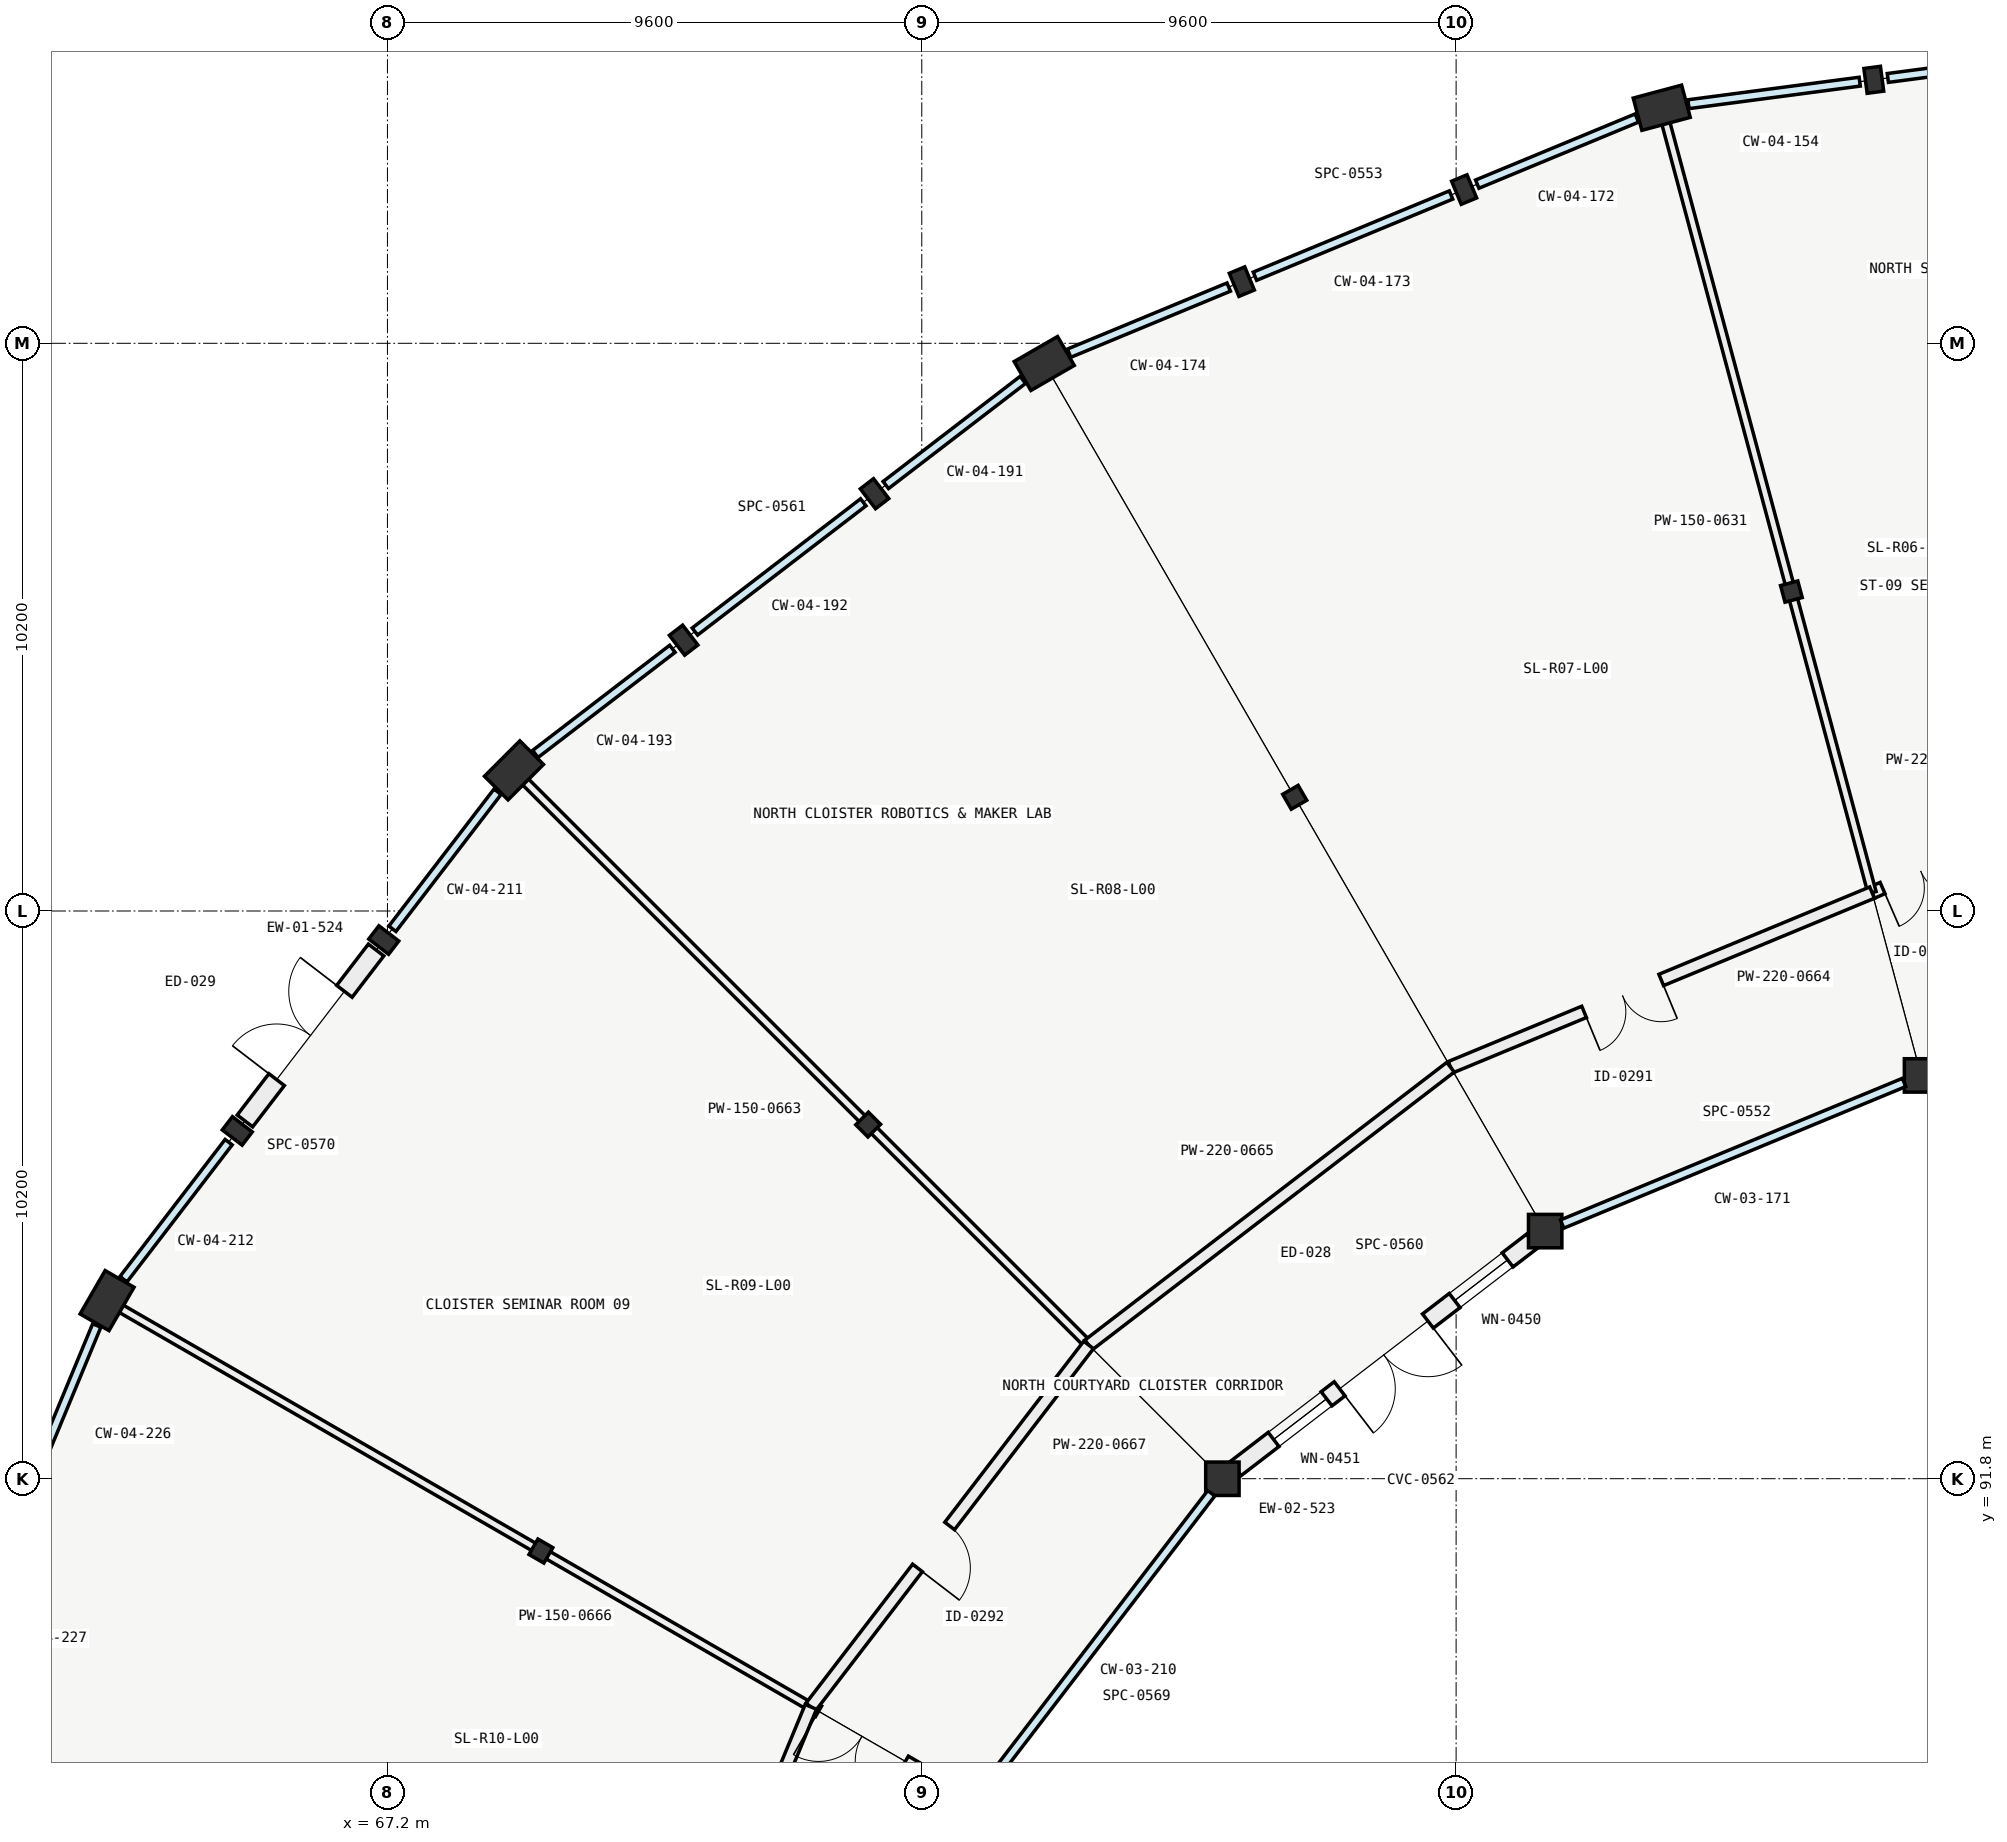
"""IFC4 building model, lengths in metres.
Left out: names, types, materials, properties, quantities, classifications, styles, units other than length and angle.
Written with IfcOpenShell. Run it as: python <this file> out.ifc"""

import sys

from ifc_helpers import new_model, si_unit, direction, frame, frame_2d, origin, origin_2d, place, context, subcontext, project, spatial, rectangle, circle, i_section, extrude, element, fill, save


model = new_model("IFC4")
c1 = context("Model", 3, precision=1e-05, world=origin(), true_north=direction((0.0, 1.0)))
c2 = subcontext(c1, "Body", "Model", "MODEL_VIEW")
j1 = project(units=[si_unit("LENGTHUNIT", "METRE"), si_unit("PLANEANGLEUNIT", "RADIAN")], contexts=[c1])
p1 = place(None, origin())
s1 = spatial("IfcSite", under=j1, at=p1, CompositionType="ELEMENT")
p2 = place(p1, origin())
s2 = spatial("IfcBuilding", under=s1, at=p2, CompositionType="ELEMENT")
p3 = place(p2, origin())
s3 = spatial("IfcBuildingStorey", under=s2, at=p3, CompositionType="ELEMENT", Elevation=0.0)
p4 = place(p3, frame((94.753, 99.046, -0.4), z_axis=(0.0, 0.0, 1.0), x_axis=(-0.258819045103, 0.965925826289, 0.0)))
e1 = element("IfcColumn", 1, at=p4, inside=s3, PredefinedType="COLUMN", context=c2, shape_type="SweptSolid", body=[
    extrude(circle(Radius=0.3, at=origin_2d()), origin(), (0.0, 0.0, 1.0), 5.8),
])
p5 = place(p3, frame((92.424, 107.739, -0.4), z_axis=(0.0, 0.0, 1.0), x_axis=(-0.258819045103, 0.965925826289, 0.0)))
e2 = element("IfcColumn", 2, at=p5, inside=s3, PredefinedType="COLUMN", context=c2, shape_type="SweptSolid", body=[
    extrude(i_section(OverallWidth=0.309, OverallDepth=0.321, WebThickness=0.014, FlangeThickness=0.022, FilletRadius=0.017, at=origin_2d()), origin(), (0.0, 0.0, 1.0), 5.8),
])
p6 = place(p3, frame((90.094, 116.433, -0.4), z_axis=(0.0, 0.0, 1.0), x_axis=(-0.258819045103, 0.965925826289, 0.0)))
e3 = element("IfcColumn", 3, at=p6, inside=s3, PredefinedType="COLUMN", context=c2, shape_type="SweptSolid", body=[
    extrude(rectangle(XDim=0.6, YDim=0.9, at=origin_2d()), origin(), (0.0, 0.0, 1.0), 5.8),
])
p7 = place(p3, frame((88.0, 96.249, -0.4), z_axis=(0.0, 0.0, 1.0), x_axis=(-0.5, 0.866025403784, 0.0)))
e4 = element("IfcColumn", 4, at=p7, inside=s3, PredefinedType="COLUMN", context=c2, shape_type="SweptSolid", body=[
    extrude(circle(Radius=0.3, at=origin_2d()), origin(), (0.0, 0.0, 1.0), 5.8),
])
p8 = place(p3, frame((83.5, 104.043, -0.4), z_axis=(0.0, 0.0, 1.0), x_axis=(-0.5, 0.866025403784, 0.0)))
e5 = element("IfcColumn", 5, at=p8, inside=s3, PredefinedType="COLUMN", context=c2, shape_type="SweptSolid", body=[
    extrude(i_section(OverallWidth=0.309, OverallDepth=0.321, WebThickness=0.014, FlangeThickness=0.022, FilletRadius=0.017, at=origin_2d()), origin(), (0.0, 0.0, 1.0), 5.8),
])
p9 = place(p3, frame((79.0, 111.837, -0.4), z_axis=(0.0, 0.0, 1.0), x_axis=(-0.5, 0.866025403784, 0.0)))
e6 = element("IfcColumn", 6, at=p9, inside=s3, PredefinedType="COLUMN", context=c2, shape_type="SweptSolid", body=[
    extrude(rectangle(XDim=0.6, YDim=0.9, at=origin_2d()), origin(), (0.0, 0.0, 1.0), 5.8),
])
p10 = place(p3, frame((82.201, 91.799, -0.4), z_axis=(0.0, 0.0, 1.0), x_axis=(-0.707106781187, 0.707106781187, 0.0)))
e7 = element("IfcColumn", 7, at=p10, inside=s3, PredefinedType="COLUMN", context=c2, shape_type="SweptSolid", body=[
    extrude(circle(Radius=0.3, at=origin_2d()), origin(), (0.0, 0.0, 1.0), 5.8),
])
p11 = place(p3, frame((75.837, 98.163, -0.4), z_axis=(0.0, 0.0, 1.0), x_axis=(-0.707106781187, 0.707106781187, 0.0)))
e8 = element("IfcColumn", 8, at=p11, inside=s3, PredefinedType="COLUMN", context=c2, shape_type="SweptSolid", body=[
    extrude(i_section(OverallWidth=0.309, OverallDepth=0.321, WebThickness=0.014, FlangeThickness=0.022, FilletRadius=0.017, at=origin_2d()), origin(), (0.0, 0.0, 1.0), 5.8),
])
p12 = place(p3, frame((69.473, 104.527, -0.4), z_axis=(0.0, 0.0, 1.0), x_axis=(-0.707106781187, 0.707106781187, 0.0)))
e9 = element("IfcColumn", 9, at=p12, inside=s3, PredefinedType="COLUMN", context=c2, shape_type="SweptSolid", body=[
    extrude(rectangle(XDim=0.6, YDim=0.9, at=origin_2d()), origin(), (0.0, 0.0, 1.0), 5.8),
])
p13 = place(p3, frame((69.957, 90.5, -0.4), z_axis=(0.0, 0.0, 1.0), x_axis=(-0.866025403784, 0.5, 0.0)))
e10 = element("IfcColumn", 10, at=p13, inside=s3, PredefinedType="COLUMN", context=c2, shape_type="SweptSolid", body=[
    extrude(i_section(OverallWidth=0.309, OverallDepth=0.321, WebThickness=0.014, FlangeThickness=0.022, FilletRadius=0.017, at=origin_2d()), origin(), (0.0, 0.0, 1.0), 5.8),
])
p14 = place(p3, frame((62.163, 95.0, -0.4), z_axis=(0.0, 0.0, 1.0), x_axis=(-0.866025403784, 0.5, 0.0)))
e11 = element("IfcColumn", 11, at=p14, inside=s3, PredefinedType="COLUMN", context=c2, shape_type="SweptSolid", body=[
    extrude(rectangle(XDim=0.6, YDim=0.9, at=origin_2d()), origin(), (0.0, 0.0, 1.0), 5.8),
])
for number, where, z_axis, x_axis in (
    (12, (93.904, 116.934, -0.4), (0.0, 0.0, 1.0), (0.991, 0.131, 0.0)),
    (13, (86.544, 114.962, -0.4), (0.0, 0.0, 1.0), (0.924, 0.383, 0.0)),
    (14, (82.55, 113.308, -0.4), (0.0, 0.0, 1.0), (0.924, 0.383, 0.0)),
    (15, (75.951, 109.498, -0.4), (0.0, 0.0, 1.0), (0.793, 0.609, 0.0)),
    (16, (72.522, 106.866, -0.4), (0.0, 0.0, 1.0), (0.793, 0.609, 0.0)),
    (17, (67.134, 101.478, -0.4), (0.0, 0.0, 1.0), (0.609, 0.793, 0.0)),
    (18, (64.502, 98.049, -0.4), (0.0, 0.0, 1.0), (0.609, 0.793, 0.0)),
):
    element("IfcColumn", number, at=place(p3, frame(where, z_axis=z_axis, x_axis=x_axis)), inside=s3, PredefinedType="PILASTER", context=c2, shape_type="SweptSolid", body=[
        extrude(rectangle(XDim=0.3, YDim=0.45, at=origin_2d()), origin(), (0.0, 0.0, 1.0), 5.8),
    ])
p15 = place(p3, frame((87.762, 96.066, 0.0), z_axis=(0.0, 0.0, 1.0), x_axis=(-0.793363268085, -0.608748490637, 0.0)))
e19 = element("IfcWall", 19, at=p15, inside=s3, PredefinedType="SOLIDWALL", context=c2, shape_type="SweptSolid", body=[
    extrude(rectangle(XDim=6.71, YDim=0.32, at=frame_2d((3.355, 0.0))), origin(), (0.0, 0.0, 1.0), 4.694),
])
p16 = place(p15, frame((2.355, 0.0, 0.0)))
e20 = element("IfcOpeningElement", 20, at=p16, cuts=e19, PredefinedType="OPENING", context=c2, shape_type="SweptSolid", body=[
    extrude(rectangle(XDim=2.0, YDim=2.4, at=frame_2d((1.0, 1.2))), frame((0.0, 0.17, 0.0), z_axis=(0.0, -1.0, 0.0), x_axis=(1.0, 0.0, 0.0)), (0.0, 0.0, 1.0), 0.34),
])
p17 = place(p15, frame((0.55, 0.0, 0.7)))
e21 = element("IfcOpeningElement", 21, at=p17, cuts=e19, PredefinedType="OPENING", context=c2, shape_type="SweptSolid", body=[
    extrude(rectangle(XDim=1.2, YDim=2.4, at=frame_2d((0.6, 1.2))), frame((0.0, 0.17, 0.0), z_axis=(0.0, -1.0, 0.0), x_axis=(1.0, 0.0, 0.0)), (0.0, 0.0, 1.0), 0.34),
])
p18 = place(p15, frame((4.65, 0.0, 0.7)))
e22 = element("IfcOpeningElement", 22, at=p18, cuts=e19, PredefinedType="OPENING", context=c2, shape_type="SweptSolid", body=[
    extrude(rectangle(XDim=1.2, YDim=2.4, at=frame_2d((0.6, 1.2))), frame((0.0, 0.17, 0.0), z_axis=(0.0, -1.0, 0.0), x_axis=(1.0, 0.0, 0.0)), (0.0, 0.0, 1.0), 0.34),
])
p19 = place(p3, frame((64.64, 98.228, 0.0), z_axis=(0.0, 0.0, 1.0), x_axis=(0.608722784878, 0.79338299148, 0.0)))
e23 = element("IfcWall", 23, at=p19, inside=s3, PredefinedType="SOLIDWALL", context=c2, shape_type="SweptSolid", body=[
    extrude(rectangle(XDim=3.871, YDim=0.35, at=frame_2d((1.936, 0.0))), origin(), (0.0, 0.0, 1.0), 4.643),
])
p20 = place(p19, frame((0.936, 0.0, 0.0)))
e24 = element("IfcOpeningElement", 24, at=p20, cuts=e23, PredefinedType="OPENING", context=c2, shape_type="SweptSolid", body=[
    extrude(rectangle(XDim=2.0, YDim=2.4, at=frame_2d((1.0, 1.2))), frame((0.0, 0.185, 0.0), z_axis=(0.0, -1.0, 0.0), x_axis=(1.0, 0.0, 0.0)), (0.0, 0.0, 1.0), 0.37),
])
p21 = place(p3, frame((77.647, 86.06, 0.0), z_axis=(0.0, 0.0, 1.0), x_axis=(-0.866040564224, 0.499973740429, 0.0)))
e25 = element("IfcWall", 25, at=p21, inside=s3, PredefinedType="PARTITIONING", context=c2, shape_type="SweptSolid", body=[
    extrude(rectangle(XDim=3.28, YDim=0.22, at=frame_2d((1.64, 0.0))), origin(), (0.0, 0.0, 1.0), 4.567),
])
p22 = place(p21, frame((1.32, 0.0, 0.0)))
e26 = element("IfcOpeningElement", 26, at=p22, cuts=e25, PredefinedType="OPENING", context=c2, shape_type="SweptSolid", body=[
    extrude(rectangle(XDim=1.8, YDim=2.2, at=frame_2d((0.9, 1.1))), frame((0.0, 0.12, 0.0), z_axis=(0.0, -1.0, 0.0), x_axis=(1.0, 0.0, 0.0)), (0.0, 0.0, 1.0), 0.24),
])
p23 = place(p3, frame((96.51, 103.478, 0.0), z_axis=(0.0, 0.0, 1.0), x_axis=(-0.916855346374, -0.399219580964, 0.0)))
e27 = element("IfcWall", 27, at=p23, inside=s3, PredefinedType="PARTITIONING", context=c2, shape_type="SweptSolid", body=[
    extrude(rectangle(XDim=2.876, YDim=0.22, at=frame_2d((1.438, 0.0))), origin(), (0.0, 0.0, 1.0), 4.567),
])
p24 = place(p23, frame((1.17, 0.0, 0.0)))
e28 = element("IfcOpeningElement", 28, at=p24, cuts=e27, PredefinedType="OPENING", context=c2, shape_type="SweptSolid", body=[
    extrude(rectangle(XDim=1.5, YDim=2.2, at=frame_2d((0.75, 1.1))), frame((0.0, 0.12, 0.0), z_axis=(0.0, -1.0, 0.0), x_axis=(1.0, 0.0, 0.0)), (0.0, 0.0, 1.0), 0.24),
])
p25 = place(p3, frame((93.873, 102.33, 0.0), z_axis=(0.0, 0.0, 1.0), x_axis=(-0.258810530041, 0.965928107853, 0.0)))
e29 = element("IfcWall", 29, at=p25, inside=s3, PredefinedType="PARTITIONING", context=c2, shape_type="SweptSolid", body=[
    extrude(rectangle(XDim=14.48, YDim=0.15, at=frame_2d((7.24, 0.0))), origin(), (0.0, 0.0, 1.0), 4.567),
])
p26 = place(p3, frame((79.797, 94.203, 0.0), z_axis=(0.0, 0.0, 1.0), x_axis=(-0.707106781187, 0.707106781187, 0.0)))
e30 = element("IfcWall", 30, at=p26, inside=s3, PredefinedType="PARTITIONING", context=c2, shape_type="SweptSolid", body=[
    extrude(rectangle(XDim=14.48, YDim=0.15, at=frame_2d((7.24, 0.0))), origin(), (0.0, 0.0, 1.0), 4.567),
])
p27 = place(p3, frame((93.873, 102.33, 0.0), z_axis=(0.0, 0.0, 1.0), x_axis=(-0.923874167149, -0.382696385238, 0.0)))
e31 = element("IfcWall", 31, at=p27, inside=s3, PredefinedType="PARTITIONING", context=c2, shape_type="SweptSolid", body=[
    extrude(rectangle(XDim=8.197, YDim=0.22, at=frame_2d((4.099, 0.0))), origin(), (0.0, 0.0, 1.0), 4.567),
])
p28 = place(p27, frame((4.1, 0.0, 0.0)))
e32 = element("IfcOpeningElement", 32, at=p28, cuts=e31, PredefinedType="OPENING", context=c2, shape_type="SweptSolid", body=[
    extrude(rectangle(XDim=1.5, YDim=2.2, at=frame_2d((0.75, 1.1))), frame((0.0, 0.12, 0.0), z_axis=(0.0, -1.0, 0.0), x_axis=(1.0, 0.0, 0.0)), (0.0, 0.0, 1.0), 0.24),
])
p29 = place(p3, frame((86.3, 99.193, 0.0), z_axis=(0.0, 0.0, 1.0), x_axis=(-0.793357497113, -0.608756011694, 0.0)))
e33 = element("IfcWall", 33, at=p29, inside=s3, PredefinedType="PARTITIONING", context=c2, shape_type="SweptSolid", body=[
    extrude(rectangle(XDim=8.197, YDim=0.22, at=frame_2d((4.099, 0.0))), origin(), (0.0, 0.0, 1.0), 4.567),
])
p30 = place(p3, frame((74.807, 87.7, 0.0), z_axis=(0.0, 0.0, 1.0), x_axis=(-0.866025544155, 0.499999756871, 0.0)))
e34 = element("IfcWall", 34, at=p30, inside=s3, PredefinedType="PARTITIONING", context=c2, shape_type="SweptSolid", body=[
    extrude(rectangle(XDim=14.48, YDim=0.15, at=frame_2d((7.24, 0.0))), origin(), (0.0, 0.0, 1.0), 4.567),
])
p31 = place(p3, frame((79.797, 94.203, 0.0), z_axis=(0.0, 0.0, 1.0), x_axis=(-0.608756011694, -0.793357497113, 0.0)))
e35 = element("IfcWall", 35, at=p31, inside=s3, PredefinedType="PARTITIONING", context=c2, shape_type="SweptSolid", body=[
    extrude(rectangle(XDim=8.197, YDim=0.22, at=frame_2d((4.099, 0.0))), origin(), (0.0, 0.0, 1.0), 4.567),
])
p32 = place(p31, frame((4.1, 0.0, 0.0)))
e36 = element("IfcOpeningElement", 36, at=p32, cuts=e35, PredefinedType="OPENING", context=c2, shape_type="SweptSolid", body=[
    extrude(rectangle(XDim=0.95, YDim=2.1, at=frame_2d((0.475, 1.05))), frame((0.0, 0.12, 0.0), z_axis=(0.0, -1.0, 0.0), x_axis=(1.0, 0.0, 0.0)), (0.0, 0.0, 1.0), 0.24),
])
p33 = place(p3, frame((74.807, 87.7, 0.0), z_axis=(0.0, 0.0, 1.0), x_axis=(-0.382696385238, -0.923874167149, 0.0)))
e37 = element("IfcWall", 37, at=p33, inside=s3, PredefinedType="PARTITIONING", context=c2, shape_type="SweptSolid", body=[
    extrude(rectangle(XDim=8.197, YDim=0.22, at=frame_2d((4.099, 0.0))), origin(), (0.0, 0.0, 1.0), 4.567),
])
p34 = place(p33, frame((4.1, 0.0, 0.0)))
e38 = element("IfcOpeningElement", 38, at=p34, cuts=e37, PredefinedType="OPENING", context=c2, shape_type="SweptSolid", body=[
    extrude(rectangle(XDim=1.5, YDim=2.2, at=frame_2d((0.75, 1.1))), frame((0.0, 0.12, 0.0), z_axis=(0.0, -1.0, 0.0), x_axis=(1.0, 0.0, 0.0)), (0.0, 0.0, 1.0), 0.24),
])
p35 = place(p16, origin())
e39 = element("IfcDoor", 39, at=p35, inside=s3, OperationType="DOUBLE_DOOR_SINGLE_SWING", PredefinedType="DOOR", context=c2, shape_type="SweptSolid", body=[
    extrude(rectangle(XDim=2.0, YDim=2.4, at=frame_2d((1.0, 1.2))), frame((0.0, 0.025, 0.0), z_axis=(0.0, -1.0, 0.0), x_axis=(1.0, 0.0, 0.0)), (0.0, 0.0, 1.0), 0.05),
])
fill(e20, e39)
p36 = place(p17, origin())
e40 = element("IfcWindow", 40, at=p36, inside=s3, PartitioningType="SINGLE_PANEL", PredefinedType="WINDOW", context=c2, shape_type="SweptSolid", body=[
    extrude(rectangle(XDim=1.2, YDim=2.4, at=frame_2d((0.6, 1.2))), frame((0.0, 0.03, 0.0), z_axis=(0.0, -1.0, 0.0), x_axis=(1.0, 0.0, 0.0)), (0.0, 0.0, 1.0), 0.06),
])
fill(e21, e40)
p37 = place(p18, origin())
e41 = element("IfcWindow", 41, at=p37, inside=s3, PartitioningType="SINGLE_PANEL", PredefinedType="WINDOW", context=c2, shape_type="SweptSolid", body=[
    extrude(rectangle(XDim=1.2, YDim=2.4, at=frame_2d((0.6, 1.2))), frame((0.0, 0.03, 0.0), z_axis=(0.0, -1.0, 0.0), x_axis=(1.0, 0.0, 0.0)), (0.0, 0.0, 1.0), 0.06),
])
fill(e22, e41)
p38 = place(p20, origin())
e42 = element("IfcDoor", 42, at=p38, inside=s3, OperationType="DOUBLE_DOOR_SINGLE_SWING", PredefinedType="DOOR", context=c2, shape_type="SweptSolid", body=[
    extrude(rectangle(XDim=2.0, YDim=2.4, at=frame_2d((1.0, 1.2))), frame((0.0, 0.025, 0.0), z_axis=(0.0, -1.0, 0.0), x_axis=(1.0, 0.0, 0.0)), (0.0, 0.0, 1.0), 0.05),
])
fill(e24, e42)
p39 = place(p22, origin())
e43 = element("IfcDoor", 43, at=p39, inside=s3, OperationType="DOUBLE_DOOR_SINGLE_SWING", PredefinedType="DOOR", context=c2, shape_type="SweptSolid", body=[
    extrude(rectangle(XDim=1.8, YDim=2.2, at=frame_2d((0.9, 1.1))), frame((0.0, 0.025, 0.0), z_axis=(0.0, -1.0, 0.0), x_axis=(1.0, 0.0, 0.0)), (0.0, 0.0, 1.0), 0.05),
])
fill(e26, e43)
p40 = place(p24, origin())
e44 = element("IfcDoor", 44, at=p40, inside=s3, OperationType="DOUBLE_DOOR_SINGLE_SWING", PredefinedType="DOOR", context=c2, shape_type="SweptSolid", body=[
    extrude(rectangle(XDim=1.5, YDim=2.2, at=frame_2d((0.75, 1.1))), frame((0.0, 0.025, 0.0), z_axis=(0.0, -1.0, 0.0), x_axis=(1.0, 0.0, 0.0)), (0.0, 0.0, 1.0), 0.05),
])
fill(e28, e44)
p41 = place(p28, origin())
e45 = element("IfcDoor", 45, at=p41, inside=s3, OperationType="DOUBLE_DOOR_SINGLE_SWING", PredefinedType="DOOR", context=c2, shape_type="SweptSolid", body=[
    extrude(rectangle(XDim=1.5, YDim=2.2, at=frame_2d((0.75, 1.1))), frame((0.0, 0.025, 0.0), z_axis=(0.0, -1.0, 0.0), x_axis=(1.0, 0.0, 0.0)), (0.0, 0.0, 1.0), 0.05),
])
fill(e32, e45)
p42 = place(p32, origin())
e46 = element("IfcDoor", 46, at=p42, inside=s3, OperationType="SINGLE_SWING_RIGHT", PredefinedType="DOOR", context=c2, shape_type="SweptSolid", body=[
    extrude(rectangle(XDim=0.95, YDim=2.1, at=frame_2d((0.475, 1.05))), frame((0.0, 0.025, 0.0), z_axis=(0.0, -1.0, 0.0), x_axis=(1.0, 0.0, 0.0)), (0.0, 0.0, 1.0), 0.05),
])
fill(e36, e46)
save(model, sys.argv[1])
